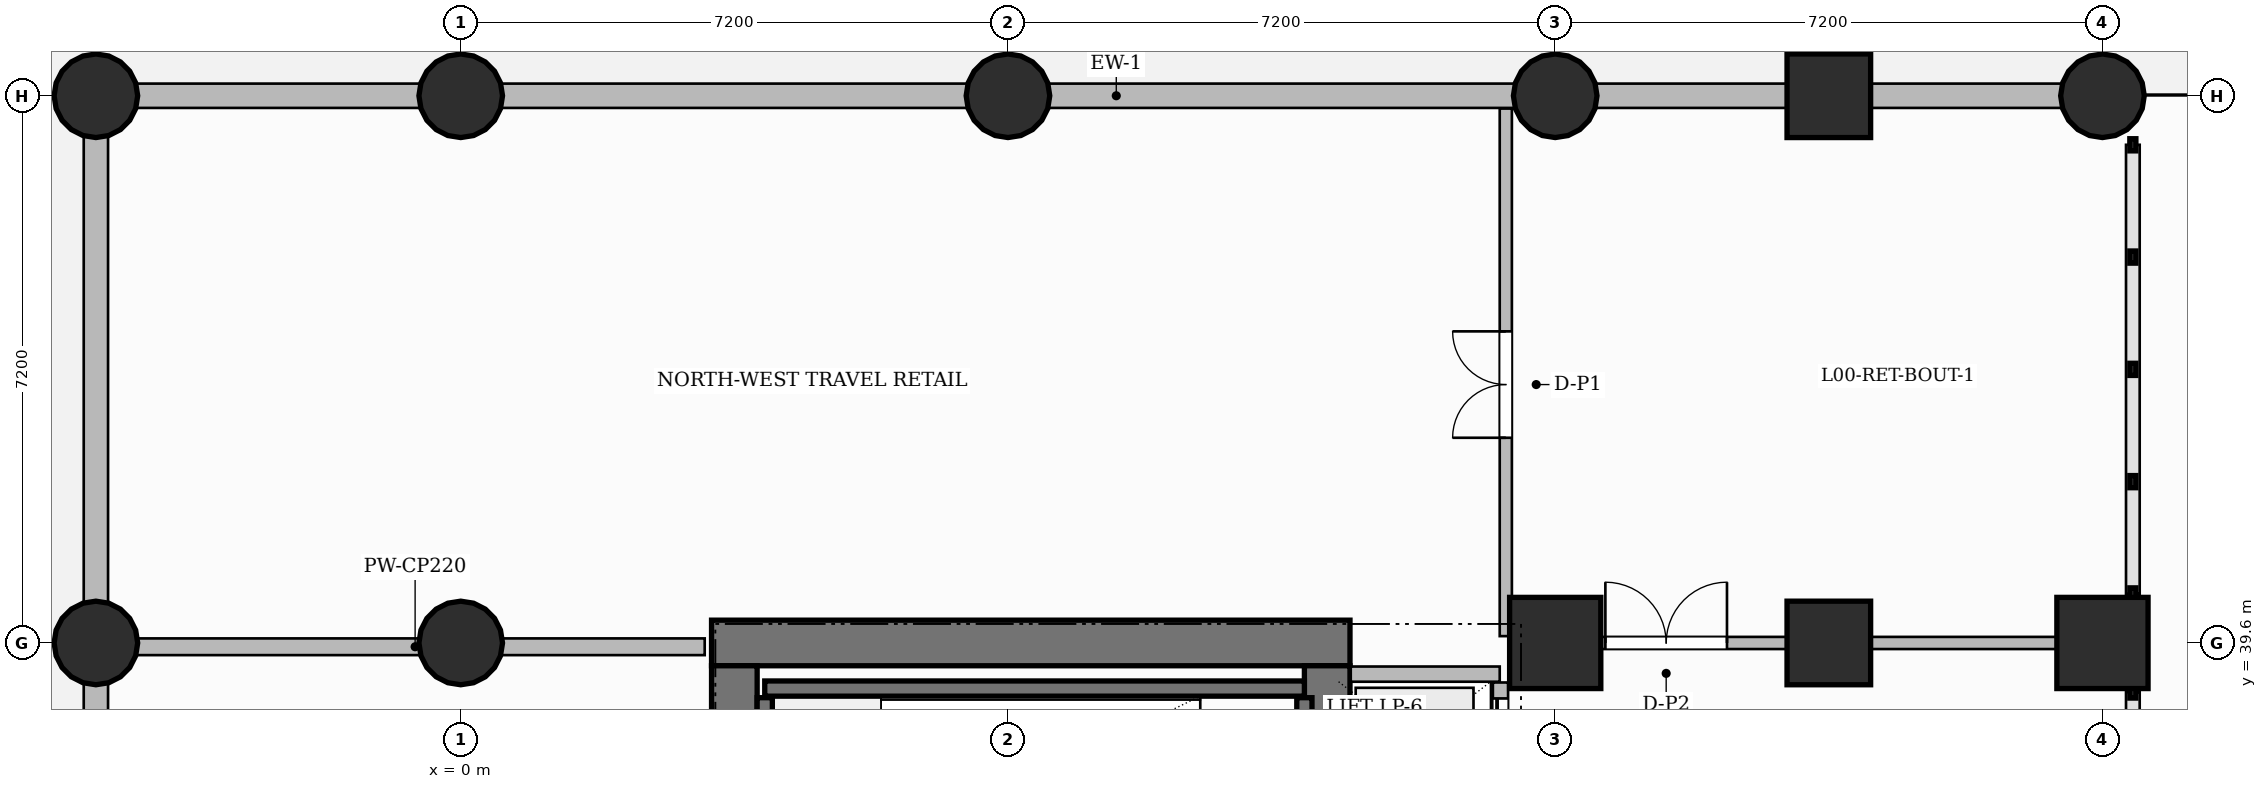
"""IFC4 building model, lengths in metres.
Left out: names, types, materials, properties, quantities, classifications, styles, units other than length and angle.
Written with IfcOpenShell. Run it as: python <this file> out.ifc"""

import sys

from ifc_helpers import new_model, si_unit, direction, frame, frame_2d, origin, origin_2d, place, context, subcontext, project, spatial, rectangle, circle, extrude, source, transform, mapped, element, fill, save


model = new_model("IFC4")
c1 = context("Model", 3, precision=1e-05, world=origin(), true_north=direction((0.0, 1.0)))
c2 = subcontext(c1, "Body", "Model", "MODEL_VIEW")
j1 = project(units=[si_unit("LENGTHUNIT", "METRE"), si_unit("PLANEANGLEUNIT", "RADIAN")], contexts=[c1])
p1 = place(None, origin())
s1 = spatial("IfcSite", under=j1, at=p1, CompositionType="ELEMENT")
p2 = place(p1, origin())
s2 = spatial("IfcBuilding", under=s1, at=p2, CompositionType="ELEMENT")
p3 = place(p2, origin())
s3 = spatial("IfcBuildingStorey", under=s2, at=p3, CompositionType="ELEMENT", Elevation=0.0)
p4 = place(p3, frame((3.3, 39.6, 0.0), z_axis=(0.0, 0.0, 1.0), x_axis=(1.0, 0.0, 0.0)))
e1 = element("IfcWall", 1, at=p4, inside=s3, PredefinedType="SHEAR", context=c2, shape_type="SweptSolid", body=[
    extrude(rectangle(XDim=8.4, YDim=0.6, at=frame_2d((4.2, 0.0))), origin(), (0.0, 0.0, 1.0), 5.4),
])
p5 = place(p3, frame((3.6, 25.5, 0.0), z_axis=(0.0, 0.0, 1.0), x_axis=(0.0, 1.0, 0.0)))
e2 = element("IfcWall", 2, at=p5, inside=s3, PredefinedType="SHEAR", context=c2, shape_type="SweptSolid", body=[
    extrude(rectangle(XDim=13.8, YDim=0.6, at=frame_2d((6.9, 0.0))), origin(), (0.0, 0.0, 1.0), 5.4),
])
p6 = place(p3, frame((11.4, 25.5, 0.0), z_axis=(0.0, 0.0, 1.0), x_axis=(0.0, 1.0, 0.0)))
e3 = element("IfcWall", 3, at=p6, inside=s3, PredefinedType="SHEAR", context=c2, shape_type="SweptSolid", body=[
    extrude(rectangle(XDim=13.8, YDim=0.6, at=frame_2d((6.9, 0.0))), origin(), (0.0, 0.0, 1.0), 5.4),
])
p7 = place(p6, frame((6.47, 0.0, 0.0)))
e4 = element("IfcOpeningElement", 4, at=p7, cuts=e3, PredefinedType="OPENING", context=c2, shape_type="SweptSolid", body=[
    extrude(rectangle(XDim=1.5, YDim=2.2, at=frame_2d((0.75, 1.1))), frame((0.0, 0.31, 0.0), z_axis=(0.0, -1.0, 0.0), x_axis=(1.0, 0.0, 0.0)), (0.0, 0.0, 1.0), 0.62),
])
m1 = source(origin(), c2, "Body", "SweptSolid", [
    extrude(circle(Radius=0.55, at=origin_2d()), origin(), (0.0, 0.0, 1.0), 5.4),
])
for number, where, z_axis, x_axis in (
    (5, (-4.8, 39.6, 0.0), (0.0, 0.0, 1.0), (1.0, 0.0, 0.0)),
    (6, (-4.8, 46.8, 0.0), (0.0, 0.0, 1.0), (1.0, 0.0, 0.0)),
    (7, (0.0, 39.6, 0.0), (0.0, 0.0, 1.0), (1.0, 0.0, 0.0)),
    (8, (0.0, 46.8, 0.0), (0.0, 0.0, 1.0), (1.0, 0.0, 0.0)),
    (9, (7.2, 46.8, 0.0), (0.0, 0.0, 1.0), (1.0, 0.0, 0.0)),
):
    element("IfcColumn", number, at=place(p3, frame(where, z_axis=z_axis, x_axis=x_axis)), inside=s3, PredefinedType="COLUMN", context=c2, shape_type="MappedRepresentation", body=[
        mapped(m1, transform((0.0, 0.0, 0.0), scale=1.0)),
    ])
m2 = source(origin(), c2, "Body", "SweptSolid", [
    extrude(rectangle(XDim=1.2, YDim=1.2, at=origin_2d()), origin(), (0.0, 0.0, 1.0), 5.4),
])
p8 = place(p3, frame((14.4, 39.6, 0.0), z_axis=(0.0, 0.0, 1.0), x_axis=(1.0, 0.0, 0.0)))
e10 = element("IfcColumn", 10, at=p8, inside=s3, PredefinedType="COLUMN", context=c2, shape_type="MappedRepresentation", body=[
    mapped(m2, transform((0.0, 0.0, 0.0), scale=1.0)),
])
p9 = place(p3, frame((14.4, 46.8, 0.0), z_axis=(0.0, 0.0, 1.0), x_axis=(1.0, 0.0, 0.0)))
e11 = element("IfcColumn", 11, at=p9, inside=s3, PredefinedType="COLUMN", context=c2, shape_type="MappedRepresentation", body=[
    mapped(m1, transform((0.0, 0.0, 0.0), scale=1.0)),
])
p10 = place(p3, frame((21.6, 39.6, 0.0), z_axis=(0.0, 0.0, 1.0), x_axis=(1.0, 0.0, 0.0)))
e12 = element("IfcColumn", 12, at=p10, inside=s3, PredefinedType="COLUMN", context=c2, shape_type="MappedRepresentation", body=[
    mapped(m2, transform((0.0, 0.0, 0.0), scale=1.0)),
])
p11 = place(p3, frame((21.6, 46.8, 0.0), z_axis=(0.0, 0.0, 1.0), x_axis=(1.0, 0.0, 0.0)))
e13 = element("IfcColumn", 13, at=p11, inside=s3, PredefinedType="COLUMN", context=c2, shape_type="MappedRepresentation", body=[
    mapped(m1, transform((0.0, 0.0, 0.0), scale=1.0)),
])
m3 = source(origin(), c2, "Body", "SweptSolid", [
    extrude(rectangle(XDim=1.1, YDim=1.1, at=origin_2d()), origin(), (0.0, 0.0, 1.0), 5.4),
])
for number, where, z_axis, x_axis in (
    (14, (18.0, 39.6, 0.0), (0.0, 0.0, 1.0), (1.0, 0.0, 0.0)),
    (15, (18.0, 46.8, 0.0), (0.0, 0.0, 1.0), (1.0, 0.0, 0.0)),
):
    element("IfcColumn", number, at=place(p3, frame(where, z_axis=z_axis, x_axis=x_axis)), inside=s3, PredefinedType="COLUMN", context=c2, shape_type="MappedRepresentation", body=[
        mapped(m3, transform((0.0, 0.0, 0.0), scale=1.0)),
    ])
p12 = place(p3, frame((4.0, 39.0, 0.0), z_axis=(0.0, 0.0, 1.0), x_axis=(1.0, 0.0, 0.0)))
e16 = element("IfcWall", 16, at=p12, inside=s3, PredefinedType="SHEAR", context=c2, shape_type="SweptSolid", body=[
    extrude(rectangle(XDim=7.1, YDim=0.2, at=frame_2d((3.55, 0.0))), origin(), (0.0, 0.0, 1.0), 5.4),
])
for number, where, z_axis, x_axis in (
    (17, (4.0, 36.18, 0.0), (0.0, 0.0, 1.0), (0.0, 1.0, 0.0)),
    (18, (11.1, 36.18, 0.0), (0.0, 0.0, 1.0), (0.0, 1.0, 0.0)),
):
    element("IfcWall", number, at=place(p3, frame(where, z_axis=z_axis, x_axis=x_axis)), inside=s3, PredefinedType="SHEAR", context=c2, shape_type="SweptSolid", body=[
        extrude(rectangle(XDim=2.7, YDim=0.2, at=frame_2d((1.35, 0.0))), origin(), (0.0, 0.0, 1.0), 5.4),
    ])
p13 = place(p3, frame((11.71, 39.19, 0.0), z_axis=(0.0, 0.0, 1.0), x_axis=(1.0, 0.0, 0.0)))
e19 = element("IfcWall", 19, at=p13, inside=s3, PredefinedType="PARTITIONING", context=c2, shape_type="SweptSolid", body=[
    extrude(rectangle(XDim=1.96, YDim=0.2, at=frame_2d((0.98, 0.0))), origin(), (0.0, 0.0, 1.0), 5.1),
])
p14 = place(p3, frame((13.68, 34.36, 0.0), z_axis=(0.0, 0.0, 1.0), x_axis=(0.0, 1.0, 0.0)))
e20 = element("IfcWall", 20, at=p14, inside=s3, PredefinedType="PARTITIONING", context=c2, shape_type="SweptSolid", body=[
    extrude(rectangle(XDim=4.72, YDim=0.2, at=frame_2d((2.36, 0.0))), origin(), (0.0, 0.0, 1.0), 5.1),
])
p15 = place(p14, frame((0.21, 0.0, 0.0)))
e21 = element("IfcOpeningElement", 21, at=p15, cuts=e20, PredefinedType="OPENING", context=c2, shape_type="SweptSolid", body=[
    extrude(rectangle(XDim=1.1, YDim=2.2, at=frame_2d((0.55, 1.1))), frame((0.0, 0.11, 0.0), z_axis=(0.0, -1.0, 0.0), x_axis=(1.0, 0.0, 0.0)), (0.0, 0.0, 1.0), 0.22),
])
p16 = place(p14, frame((1.81, 0.0, 0.0)))
e22 = element("IfcOpeningElement", 22, at=p16, cuts=e20, PredefinedType="OPENING", context=c2, shape_type="SweptSolid", body=[
    extrude(rectangle(XDim=1.1, YDim=2.2, at=frame_2d((0.55, 1.1))), frame((0.0, 0.11, 0.0), z_axis=(0.0, -1.0, 0.0), x_axis=(1.0, 0.0, 0.0)), (0.0, 0.0, 1.0), 0.22),
])
p17 = place(p14, frame((3.41, 0.0, 0.0)))
e23 = element("IfcOpeningElement", 23, at=p17, cuts=e20, PredefinedType="OPENING", context=c2, shape_type="SweptSolid", body=[
    extrude(rectangle(XDim=1.1, YDim=2.2, at=frame_2d((0.55, 1.1))), frame((0.0, 0.11, 0.0), z_axis=(0.0, -1.0, 0.0), x_axis=(1.0, 0.0, 0.0)), (0.0, 0.0, 1.0), 0.22),
])
p18 = place(p3, frame((-4.41, 39.55, 0.0), z_axis=(0.0, 0.0, 1.0), x_axis=(1.0, 0.0, 0.0)))
e24 = element("IfcWall", 24, at=p18, inside=s3, PredefinedType="PARTITIONING", context=c2, shape_type="SweptSolid", body=[
    extrude(rectangle(XDim=7.62, YDim=0.22, at=frame_2d((3.81, 0.0))), origin(), (0.0, 0.0, 1.0), 4.085),
])
p19 = place(p3, frame((13.84, 39.6, 0.0), z_axis=(0.0, 0.0, 1.0), x_axis=(1.0, 0.0, 0.0)))
e25 = element("IfcWall", 25, at=p19, inside=s3, PredefinedType="PARTITIONING", context=c2, shape_type="SweptSolid", body=[
    extrude(rectangle(XDim=7.92, YDim=0.16, at=frame_2d((3.96, 0.0))), origin(), (0.0, 0.0, 1.0), 4.085),
])
p20 = place(p19, frame((1.22, 0.0, 0.0)))
e26 = element("IfcOpeningElement", 26, at=p20, cuts=e25, PredefinedType="OPENING", context=c2, shape_type="SweptSolid", body=[
    extrude(rectangle(XDim=1.6, YDim=2.4, at=frame_2d((0.8, 1.2))), frame((0.0, 0.09, 0.0), z_axis=(0.0, -1.0, 0.0), x_axis=(1.0, 0.0, 0.0)), (0.0, 0.0, 1.0), 0.18),
])
p21 = place(p3, frame((13.75, 39.69, 0.0), z_axis=(0.0, 0.0, 1.0), x_axis=(0.0, 1.0, 0.0)))
e27 = element("IfcWall", 27, at=p21, inside=s3, PredefinedType="PARTITIONING", context=c2, shape_type="SweptSolid", body=[
    extrude(rectangle(XDim=6.942, YDim=0.16, at=frame_2d((3.471, 0.0))), origin(), (0.0, 0.0, 1.0), 5.1),
])
p22 = place(p21, frame((2.61, 0.0, 0.0)))
e28 = element("IfcOpeningElement", 28, at=p22, cuts=e27, PredefinedType="OPENING", context=c2, shape_type="SweptSolid", body=[
    extrude(rectangle(XDim=1.4, YDim=2.35, at=frame_2d((0.7, 1.175))), frame((0.0, 0.09, 0.0), z_axis=(0.0, -1.0, 0.0), x_axis=(1.0, 0.0, 0.0)), (0.0, 0.0, 1.0), 0.18),
])
p23 = place(p3, frame((-4.8, 46.8, 0.0), z_axis=(0.0, 0.0, 1.0), x_axis=(1.0, 0.0, 0.0)))
e29 = element("IfcWall", 29, at=p23, inside=s3, PredefinedType="SOLIDWALL", context=c2, shape_type="SweptSolid", body=[
    extrude(rectangle(XDim=26.85, YDim=0.32, at=frame_2d((13.425, 0.0))), origin(), (0.0, 0.0, 1.0), 4.085),
])
p24 = place(p3, frame((-4.8, 0.05, 0.0), z_axis=(0.0, 0.0, 1.0), x_axis=(0.0, 1.0, 0.0)))
e30 = element("IfcWall", 30, at=p24, inside=s3, PredefinedType="SOLIDWALL", context=c2, shape_type="SweptSolid", body=[
    extrude(rectangle(XDim=46.7, YDim=0.32, at=frame_2d((23.35, 0.0))), origin(), (0.0, 0.0, 1.0), 4.085),
])
p25 = place(p24, frame((16.75, 0.0, 0.0)))
e31 = element("IfcOpeningElement", 31, at=p25, cuts=e30, PredefinedType="OPENING", context=c2, shape_type="SweptSolid", body=[
    extrude(rectangle(XDim=2.4, YDim=2.8, at=frame_2d((1.2, 1.4))), frame((0.0, 0.17, 0.0), z_axis=(0.0, -1.0, 0.0), x_axis=(1.0, 0.0, 0.0)), (0.0, 0.0, 1.0), 0.34),
])
p26 = place(p24, frame((27.85, 0.0, 0.0)))
e32 = element("IfcOpeningElement", 32, at=p26, cuts=e30, PredefinedType="OPENING", context=c2, shape_type="SweptSolid", body=[
    extrude(rectangle(XDim=1.8, YDim=2.4, at=frame_2d((0.9, 1.2))), frame((0.0, 0.17, 0.0), z_axis=(0.0, -1.0, 0.0), x_axis=(1.0, 0.0, 0.0)), (0.0, 0.0, 1.0), 0.34),
])
p27 = place(p24, frame((35.05, 0.0, 0.0)))
e33 = element("IfcOpeningElement", 33, at=p27, cuts=e30, PredefinedType="OPENING", context=c2, shape_type="SweptSolid", body=[
    extrude(rectangle(XDim=1.8, YDim=2.4, at=frame_2d((0.9, 1.2))), frame((0.0, 0.17, 0.0), z_axis=(0.0, -1.0, 0.0), x_axis=(1.0, 0.0, 0.0)), (0.0, 0.0, 1.0), 0.34),
])
m4 = source(origin(), c2, "Body", "SweptSolid", [
    extrude(rectangle(XDim=1.6, YDim=2.4, at=frame_2d((0.8, 1.2))), frame((0.0, 0.025, 0.0), z_axis=(0.0, -1.0, 0.0), x_axis=(1.0, 0.0, 0.0)), (0.0, 0.0, 1.0), 0.05),
])
p28 = place(p20, origin())
e34 = element("IfcDoor", 34, at=p28, inside=s3, OperationType="DOUBLE_DOOR_SINGLE_SWING", PredefinedType="DOOR", context=c2, shape_type="MappedRepresentation", body=[
    mapped(m4, transform((0.0, 0.0, 0.0), scale=1.0)),
])
fill(e26, e34)
m5 = source(origin(), c2, "Body", "SweptSolid", [
    extrude(rectangle(XDim=1.4, YDim=2.35, at=frame_2d((0.7, 1.175))), frame((0.0, 0.025, 0.0), z_axis=(0.0, -1.0, 0.0), x_axis=(1.0, 0.0, 0.0)), (0.0, 0.0, 1.0), 0.05),
])
p29 = place(p22, origin())
e35 = element("IfcDoor", 35, at=p29, inside=s3, OperationType="DOUBLE_DOOR_SINGLE_SWING", PredefinedType="DOOR", context=c2, shape_type="MappedRepresentation", body=[
    mapped(m5, transform((0.0, 0.0, 0.0), scale=1.0)),
])
fill(e28, e35)
m6 = source(origin(), c2, "Body", "SweptSolid", [
    extrude(rectangle(XDim=1.1, YDim=2.2, at=frame_2d((0.55, 1.1))), frame((0.0, 0.025, 0.0), z_axis=(0.0, -1.0, 0.0), x_axis=(1.0, 0.0, 0.0)), (0.0, 0.0, 1.0), 0.05),
])
p30 = place(p17, origin())
e36 = element("IfcDoor", 36, at=p30, inside=s3, OperationType="SLIDING_TO_LEFT", PredefinedType="DOOR", context=c2, shape_type="MappedRepresentation", body=[
    mapped(m6, transform((0.0, 0.0, 0.0), scale=1.0)),
])
fill(e23, e36)
save(model, sys.argv[1])
